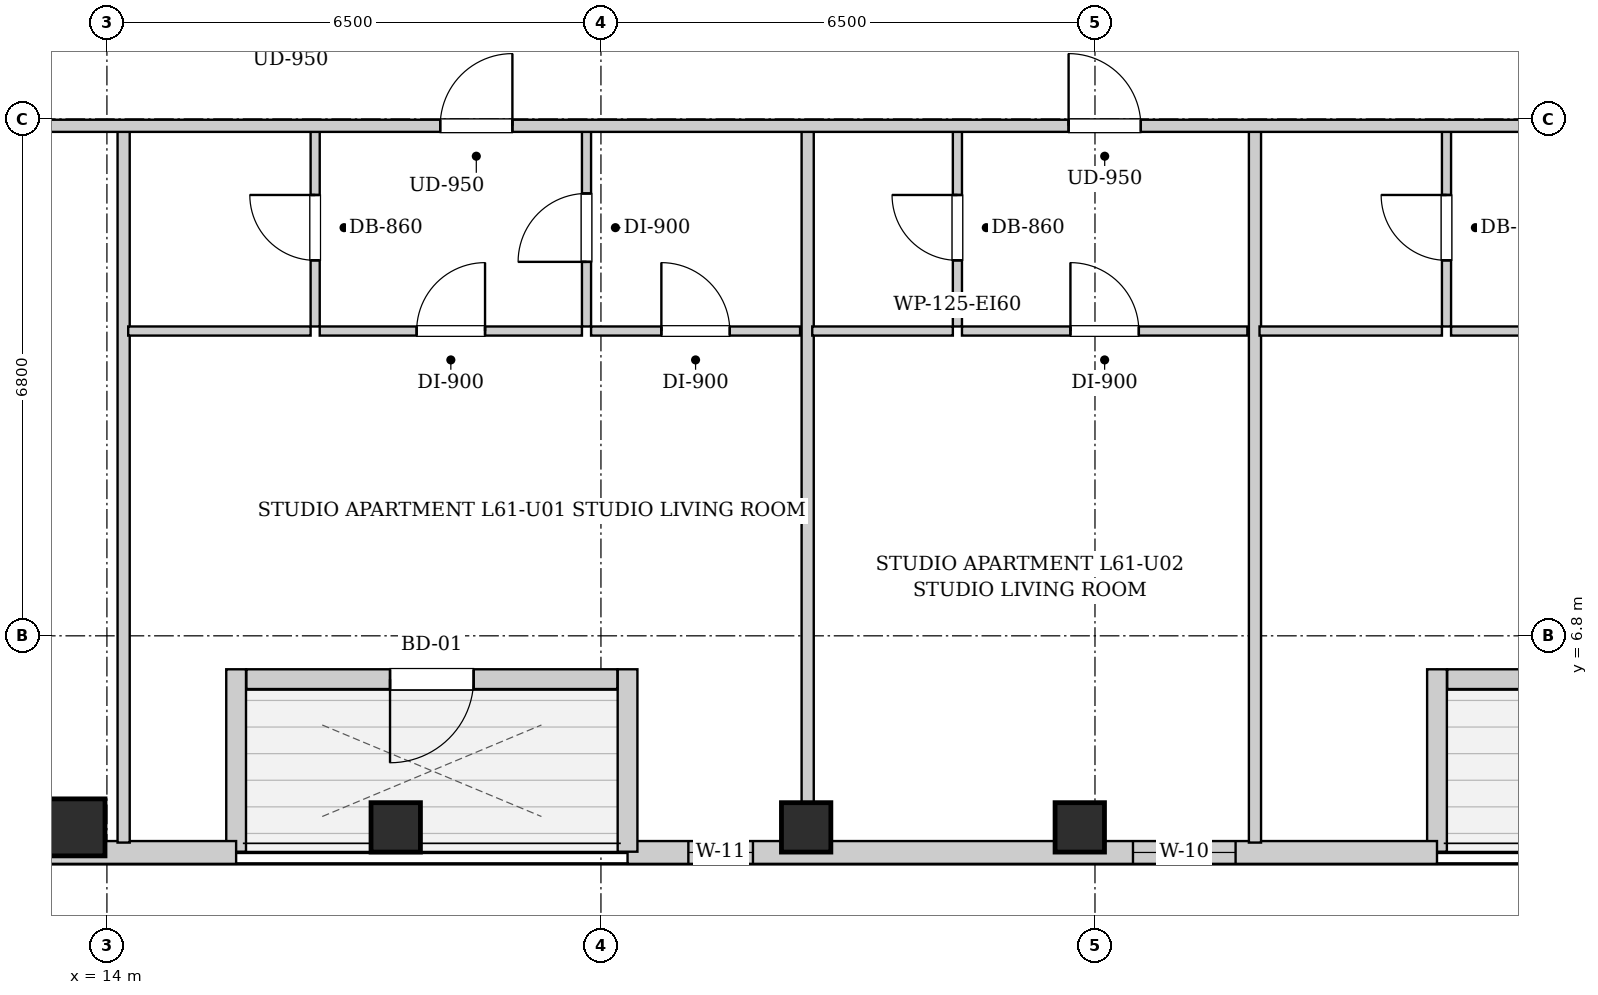
"""IFC4 building model, lengths in metres.
Left out: names, types, materials, properties, quantities, classifications, styles, units other than length and angle.
Written with IfcOpenShell. Run it as: python <this file> out.ifc"""

import sys

from ifc_helpers import new_model, si_unit, direction, frame, frame_2d, origin, origin_2d, place, context, subcontext, project, spatial, rectangle, extrude, element, fill, save


model = new_model("IFC4")
c1 = context("Model", 3, precision=1e-05, world=origin(), true_north=direction((0.0, 1.0)))
c2 = subcontext(c1, "Body", "Model", "MODEL_VIEW")
j1 = project(units=[si_unit("LENGTHUNIT", "METRE"), si_unit("PLANEANGLEUNIT", "RADIAN")], contexts=[c1])
p1 = place(None, origin())
s1 = spatial("IfcSite", under=j1, at=p1, CompositionType="ELEMENT")
p2 = place(p1, origin())
s2 = spatial("IfcBuilding", under=s1, at=p2, CompositionType="ELEMENT")
p3 = place(p2, frame((0.0, 0.0, 210.7)))
s3 = spatial("IfcBuildingStorey", under=s2, at=p3, CompositionType="ELEMENT", Elevation=210.7)
p4 = place(p3, frame((13.6, 4.28, 0.0), z_axis=(0.0, 0.0, 1.0), x_axis=(1.0, 0.0, 0.0)))
e1 = element("IfcColumn", 1, at=p4, inside=s3, PredefinedType="COLUMN", context=c2, shape_type="SweptSolid", body=[
    extrude(rectangle(XDim=0.75, YDim=0.75, at=origin_2d()), origin(), (0.0, 0.0, 1.0), 3.3),
])
for number, where, z_axis, x_axis in (
    (2, (17.8, 4.28, 0.0), (0.0, 0.0, 1.0), (1.0, 0.0, 0.0)),
    (3, (23.2, 4.28, 0.0), (0.0, 0.0, 1.0), (1.0, 0.0, 0.0)),
    (4, (26.8, 4.28, 0.0), (0.0, 0.0, 1.0), (1.0, 0.0, 0.0)),
):
    element("IfcColumn", number, at=place(p3, frame(where, z_axis=z_axis, x_axis=x_axis)), inside=s3, PredefinedType="COLUMN", context=c2, shape_type="SweptSolid", body=[
        extrude(rectangle(XDim=0.65, YDim=0.65, at=origin_2d()), origin(), (0.0, 0.0, 1.0), 3.3),
    ])
p5 = place(p3, frame((36.366, 6.23, 0.0), z_axis=(0.0, 0.0, 1.0), x_axis=(-1.0, 0.0, 0.0)))
e5 = element("IfcWall", 5, at=p5, inside=s3, PredefinedType="SOLIDWALL", context=c2, shape_type="SweptSolid", body=[
    extrude(rectangle(XDim=4.732, YDim=0.26, at=frame_2d((2.366, 0.0))), origin(), (0.0, 0.0, 1.0), 3.04),
])
p6 = place(p5, frame((1.816, 0.0, 0.0)))
e6 = element("IfcOpeningElement", 6, at=p6, cuts=e5, PredefinedType="OPENING", context=c2, shape_type="SweptSolid", body=[
    extrude(rectangle(XDim=1.1, YDim=2.0, at=frame_2d((0.55, 1.0))), frame((0.0, 0.14, 0.0), z_axis=(0.0, -1.0, 0.0), x_axis=(1.0, 0.0, 0.0)), (0.0, 0.0, 1.0), 0.28),
])
p7 = place(p3, frame((31.5, 6.36, 0.0), z_axis=(0.0, 0.0, 1.0), x_axis=(0.0, -1.0, 0.0)))
e7 = element("IfcWall", 7, at=p7, inside=s3, PredefinedType="SOLIDWALL", context=c2, shape_type="SweptSolid", body=[
    extrude(rectangle(XDim=2.4, YDim=0.26, at=frame_2d((1.2, 0.0))), origin(), (0.0, 0.0, 1.0), 3.04),
])
p8 = place(p3, frame((31.5, 3.95, 0.0), z_axis=(0.0, 0.0, 1.0), x_axis=(-1.0, 0.0, 0.0)))
e8 = element("IfcWall", 8, at=p8, inside=s3, PredefinedType="SOLIDWALL", context=c2, shape_type="SweptSolid", body=[
    extrude(rectangle(XDim=10.65, YDim=0.3, at=frame_2d((5.325, 0.0))), origin(), (0.0, 0.0, 1.0), 3.04),
])
p9 = place(p8, frame((9.0, 0.0, 0.55)))
e9 = element("IfcOpeningElement", 9, at=p9, cuts=e8, PredefinedType="OPENING", context=c2, shape_type="SweptSolid", body=[
    extrude(rectangle(XDim=0.85, YDim=1.2, at=frame_2d((0.425, 0.6))), frame((0.0, 0.16, 0.0), z_axis=(0.0, -1.0, 0.0), x_axis=(1.0, 0.0, 0.0)), (0.0, 0.0, 1.0), 0.32),
])
p10 = place(p8, frame((2.65, 0.0, 0.55)))
e10 = element("IfcOpeningElement", 10, at=p10, cuts=e8, PredefinedType="OPENING", context=c2, shape_type="SweptSolid", body=[
    extrude(rectangle(XDim=1.35, YDim=1.2, at=frame_2d((0.675, 0.6))), frame((0.0, 0.16, 0.0), z_axis=(0.0, -1.0, 0.0), x_axis=(1.0, 0.0, 0.0)), (0.0, 0.0, 1.0), 0.32),
])
p11 = place(p3, frame((20.85, 3.96, 0.0), z_axis=(0.0, 0.0, 1.0), x_axis=(0.0, 1.0, 0.0)))
e11 = element("IfcWall", 11, at=p11, inside=s3, PredefinedType="SOLIDWALL", context=c2, shape_type="SweptSolid", body=[
    extrude(rectangle(XDim=2.4, YDim=0.26, at=frame_2d((1.2, 0.0))), origin(), (0.0, 0.0, 1.0), 3.04),
])
p12 = place(p3, frame((20.716, 6.23, 0.0), z_axis=(0.0, 0.0, 1.0), x_axis=(-1.0, 0.0, 0.0)))
e12 = element("IfcWall", 12, at=p12, inside=s3, PredefinedType="SOLIDWALL", context=c2, shape_type="SweptSolid", body=[
    extrude(rectangle(XDim=4.882, YDim=0.26, at=frame_2d((2.441, 0.0))), origin(), (0.0, 0.0, 1.0), 3.04),
])
p13 = place(p12, frame((1.891, 0.0, 0.0)))
e13 = element("IfcOpeningElement", 13, at=p13, cuts=e12, PredefinedType="OPENING", context=c2, shape_type="SweptSolid", body=[
    extrude(rectangle(XDim=1.1, YDim=2.0, at=frame_2d((0.55, 1.0))), frame((0.0, 0.14, 0.0), z_axis=(0.0, -1.0, 0.0), x_axis=(1.0, 0.0, 0.0)), (0.0, 0.0, 1.0), 0.28),
])
p14 = place(p3, frame((15.7, 6.36, 0.0), z_axis=(0.0, 0.0, 1.0), x_axis=(0.0, -1.0, 0.0)))
e14 = element("IfcWall", 14, at=p14, inside=s3, PredefinedType="SOLIDWALL", context=c2, shape_type="SweptSolid", body=[
    extrude(rectangle(XDim=2.4, YDim=0.26, at=frame_2d((1.2, 0.0))), origin(), (0.0, 0.0, 1.0), 3.04),
])
p15 = place(p3, frame((15.7, 3.95, 0.0), z_axis=(0.0, 0.0, 1.0), x_axis=(-1.0, 0.0, 0.0)))
e15 = element("IfcWall", 15, at=p15, inside=s3, PredefinedType="SOLIDWALL", context=c2, shape_type="SweptSolid", body=[
    extrude(rectangle(XDim=2.6, YDim=0.3, at=frame_2d((1.3, 0.0))), origin(), (0.0, 0.0, 1.0), 3.04),
])
p16 = place(p3, frame((14.22, 4.08, 0.0), z_axis=(0.0, 0.0, 1.0), x_axis=(0.0, 1.0, 0.0)))
e16 = element("IfcWall", 16, at=p16, inside=s3, PredefinedType="PARTITIONING", context=c2, shape_type="SweptSolid", body=[
    extrude(rectangle(XDim=9.39, YDim=0.16, at=frame_2d((4.695, 0.0))), origin(), (0.0, 0.0, 1.0), 3.04),
])
p17 = place(p3, frame((16.74, 10.87, 0.0), z_axis=(0.0, 0.0, 1.0), x_axis=(0.0, 1.0, 0.0)))
e17 = element("IfcWall", 17, at=p17, inside=s3, PredefinedType="PARTITIONING", context=c2, shape_type="SweptSolid", body=[
    extrude(rectangle(XDim=2.6, YDim=0.12, at=frame_2d((1.3, 0.0))), origin(), (0.0, 0.0, 1.0), 3.04),
])
p18 = place(p17, frame((0.87, 0.0, 0.0)))
e18 = element("IfcOpeningElement", 18, at=p18, cuts=e17, PredefinedType="OPENING", context=c2, shape_type="SweptSolid", body=[
    extrude(rectangle(XDim=0.86, YDim=2.05, at=frame_2d((0.43, 1.025))), frame((0.0, 0.07, 0.0), z_axis=(0.0, -1.0, 0.0), x_axis=(1.0, 0.0, 0.0)), (0.0, 0.0, 1.0), 0.14),
])
p19 = place(p3, frame((14.28, 10.81, 0.0), z_axis=(0.0, 0.0, 1.0), x_axis=(1.0, 0.0, 0.0)))
e19 = element("IfcWall", 19, at=p19, inside=s3, PredefinedType="PARTITIONING", context=c2, shape_type="SweptSolid", body=[
    extrude(rectangle(XDim=2.4, YDim=0.12, at=frame_2d((1.2, 0.0))), origin(), (0.0, 0.0, 1.0), 3.04),
])
p20 = place(p3, frame((20.31, 10.87, 0.0), z_axis=(0.0, 0.0, 1.0), x_axis=(0.0, 1.0, 0.0)))
e20 = element("IfcWall", 20, at=p20, inside=s3, PredefinedType="PARTITIONING", context=c2, shape_type="SweptSolid", body=[
    extrude(rectangle(XDim=2.6, YDim=0.12, at=frame_2d((1.3, 0.0))), origin(), (0.0, 0.0, 1.0), 3.04),
])
p21 = place(p20, frame((0.85, 0.0, 0.0)))
e21 = element("IfcOpeningElement", 21, at=p21, cuts=e20, PredefinedType="OPENING", context=c2, shape_type="SweptSolid", body=[
    extrude(rectangle(XDim=0.9, YDim=2.05, at=frame_2d((0.45, 1.025))), frame((0.0, 0.07, 0.0), z_axis=(0.0, -1.0, 0.0), x_axis=(1.0, 0.0, 0.0)), (0.0, 0.0, 1.0), 0.14),
])
p22 = place(p3, frame((16.8, 10.81, 0.0), z_axis=(0.0, 0.0, 1.0), x_axis=(1.0, 0.0, 0.0)))
e22 = element("IfcWall", 22, at=p22, inside=s3, PredefinedType="PARTITIONING", context=c2, shape_type="SweptSolid", body=[
    extrude(rectangle(XDim=3.45, YDim=0.12, at=frame_2d((1.725, 0.0))), origin(), (0.0, 0.0, 1.0), 3.04),
])
p23 = place(p22, frame((1.275, 0.0, 0.0)))
e23 = element("IfcOpeningElement", 23, at=p23, cuts=e22, PredefinedType="OPENING", context=c2, shape_type="SweptSolid", body=[
    extrude(rectangle(XDim=0.9, YDim=2.05, at=frame_2d((0.45, 1.025))), frame((0.0, 0.07, 0.0), z_axis=(0.0, -1.0, 0.0), x_axis=(1.0, 0.0, 0.0)), (0.0, 0.0, 1.0), 0.14),
])
p24 = place(p3, frame((20.37, 10.81, 0.0), z_axis=(0.0, 0.0, 1.0), x_axis=(1.0, 0.0, 0.0)))
e24 = element("IfcWall", 24, at=p24, inside=s3, PredefinedType="PARTITIONING", context=c2, shape_type="SweptSolid", body=[
    extrude(rectangle(XDim=2.75, YDim=0.12, at=frame_2d((1.375, 0.0))), origin(), (0.0, 0.0, 1.0), 3.04),
])
p25 = place(p24, frame((0.925, 0.0, 0.0)))
e25 = element("IfcOpeningElement", 25, at=p25, cuts=e24, PredefinedType="OPENING", context=c2, shape_type="SweptSolid", body=[
    extrude(rectangle(XDim=0.9, YDim=2.05, at=frame_2d((0.45, 1.025))), frame((0.0, 0.07, 0.0), z_axis=(0.0, -1.0, 0.0), x_axis=(1.0, 0.0, 0.0)), (0.0, 0.0, 1.0), 0.14),
])
p26 = place(p3, frame((23.22, 4.08, 0.0), z_axis=(0.0, 0.0, 1.0), x_axis=(0.0, 1.0, 0.0)))
e26 = element("IfcWall", 26, at=p26, inside=s3, PredefinedType="PARTITIONING", context=c2, shape_type="SweptSolid", body=[
    extrude(rectangle(XDim=9.39, YDim=0.16, at=frame_2d((4.695, 0.0))), origin(), (0.0, 0.0, 1.0), 3.04),
])
p27 = place(p3, frame((25.19, 10.87, 0.0), z_axis=(0.0, 0.0, 1.0), x_axis=(0.0, 1.0, 0.0)))
e27 = element("IfcWall", 27, at=p27, inside=s3, PredefinedType="PARTITIONING", context=c2, shape_type="SweptSolid", body=[
    extrude(rectangle(XDim=2.6, YDim=0.12, at=frame_2d((1.3, 0.0))), origin(), (0.0, 0.0, 1.0), 3.04),
])
p28 = place(p27, frame((0.87, 0.0, 0.0)))
e28 = element("IfcOpeningElement", 28, at=p28, cuts=e27, PredefinedType="OPENING", context=c2, shape_type="SweptSolid", body=[
    extrude(rectangle(XDim=0.86, YDim=2.05, at=frame_2d((0.43, 1.025))), frame((0.0, 0.07, 0.0), z_axis=(0.0, -1.0, 0.0), x_axis=(1.0, 0.0, 0.0)), (0.0, 0.0, 1.0), 0.14),
])
p29 = place(p3, frame((23.28, 10.81, 0.0), z_axis=(0.0, 0.0, 1.0), x_axis=(1.0, 0.0, 0.0)))
e29 = element("IfcWall", 29, at=p29, inside=s3, PredefinedType="PARTITIONING", context=c2, shape_type="SweptSolid", body=[
    extrude(rectangle(XDim=1.85, YDim=0.12, at=frame_2d((0.925, 0.0))), origin(), (0.0, 0.0, 1.0), 3.04),
])
p30 = place(p3, frame((25.25, 10.81, 0.0), z_axis=(0.0, 0.0, 1.0), x_axis=(1.0, 0.0, 0.0)))
e30 = element("IfcWall", 30, at=p30, inside=s3, PredefinedType="PARTITIONING", context=c2, shape_type="SweptSolid", body=[
    extrude(rectangle(XDim=3.755, YDim=0.12, at=frame_2d((1.877, 0.0))), origin(), (0.0, 0.0, 1.0), 3.04),
])
p31 = place(p30, frame((1.427, 0.0, 0.0)))
e31 = element("IfcOpeningElement", 31, at=p31, cuts=e30, PredefinedType="OPENING", context=c2, shape_type="SweptSolid", body=[
    extrude(rectangle(XDim=0.9, YDim=2.05, at=frame_2d((0.45, 1.025))), frame((0.0, 0.07, 0.0), z_axis=(0.0, -1.0, 0.0), x_axis=(1.0, 0.0, 0.0)), (0.0, 0.0, 1.0), 0.14),
])
p32 = place(p3, frame((29.105, 4.08, 0.0), z_axis=(0.0, 0.0, 1.0), x_axis=(0.0, 1.0, 0.0)))
e32 = element("IfcWall", 32, at=p32, inside=s3, PredefinedType="PARTITIONING", context=c2, shape_type="SweptSolid", body=[
    extrude(rectangle(XDim=9.39, YDim=0.16, at=frame_2d((4.695, 0.0))), origin(), (0.0, 0.0, 1.0), 3.04),
])
p33 = place(p3, frame((31.625, 10.87, 0.0), z_axis=(0.0, 0.0, 1.0), x_axis=(0.0, 1.0, 0.0)))
e33 = element("IfcWall", 33, at=p33, inside=s3, PredefinedType="PARTITIONING", context=c2, shape_type="SweptSolid", body=[
    extrude(rectangle(XDim=2.6, YDim=0.12, at=frame_2d((1.3, 0.0))), origin(), (0.0, 0.0, 1.0), 3.04),
])
p34 = place(p33, frame((0.87, 0.0, 0.0)))
e34 = element("IfcOpeningElement", 34, at=p34, cuts=e33, PredefinedType="OPENING", context=c2, shape_type="SweptSolid", body=[
    extrude(rectangle(XDim=0.86, YDim=2.05, at=frame_2d((0.43, 1.025))), frame((0.0, 0.07, 0.0), z_axis=(0.0, -1.0, 0.0), x_axis=(1.0, 0.0, 0.0)), (0.0, 0.0, 1.0), 0.14),
])
p35 = place(p3, frame((29.165, 10.81, 0.0), z_axis=(0.0, 0.0, 1.0), x_axis=(1.0, 0.0, 0.0)))
e35 = element("IfcWall", 35, at=p35, inside=s3, PredefinedType="PARTITIONING", context=c2, shape_type="SweptSolid", body=[
    extrude(rectangle(XDim=2.4, YDim=0.12, at=frame_2d((1.2, 0.0))), origin(), (0.0, 0.0, 1.0), 3.04),
])
p36 = place(p3, frame((31.685, 10.81, 0.0), z_axis=(0.0, 0.0, 1.0), x_axis=(1.0, 0.0, 0.0)))
e36 = element("IfcWall", 36, at=p36, inside=s3, PredefinedType="PARTITIONING", context=c2, shape_type="SweptSolid", body=[
    extrude(rectangle(XDim=3.45, YDim=0.12, at=frame_2d((1.725, 0.0))), origin(), (0.0, 0.0, 1.0), 3.04),
])
p37 = place(p36, frame((1.275, 0.0, 0.0)))
e37 = element("IfcOpeningElement", 37, at=p37, cuts=e36, PredefinedType="OPENING", context=c2, shape_type="SweptSolid", body=[
    extrude(rectangle(XDim=0.9, YDim=2.05, at=frame_2d((0.45, 1.025))), frame((0.0, 0.07, 0.0), z_axis=(0.0, -1.0, 0.0), x_axis=(1.0, 0.0, 0.0)), (0.0, 0.0, 1.0), 0.14),
])
p38 = place(p3, frame((13.15, 13.51, 0.0), z_axis=(0.0, 0.0, 1.0), x_axis=(1.0, 0.0, 0.0)))
e38 = element("IfcWall", 38, at=p38, inside=s3, PredefinedType="PARTITIONING", context=c2, shape_type="SweptSolid", body=[
    extrude(rectangle(XDim=24.6, YDim=0.16, at=frame_2d((12.3, 0.0))), origin(), (0.0, 0.0, 1.0), 3.04),
])
p39 = place(p38, frame((5.235, 0.0, 0.0)))
e39 = element("IfcOpeningElement", 39, at=p39, cuts=e38, PredefinedType="OPENING", context=c2, shape_type="SweptSolid", body=[
    extrude(rectangle(XDim=0.95, YDim=2.1, at=frame_2d((0.475, 1.05))), frame((0.0, 0.09, 0.0), z_axis=(0.0, -1.0, 0.0), x_axis=(1.0, 0.0, 0.0)), (0.0, 0.0, 1.0), 0.18),
])
p40 = place(p38, frame((13.503, 0.0, 0.0)))
e40 = element("IfcOpeningElement", 40, at=p40, cuts=e38, PredefinedType="OPENING", context=c2, shape_type="SweptSolid", body=[
    extrude(rectangle(XDim=0.95, YDim=2.1, at=frame_2d((0.475, 1.05))), frame((0.0, 0.09, 0.0), z_axis=(0.0, -1.0, 0.0), x_axis=(1.0, 0.0, 0.0)), (0.0, 0.0, 1.0), 0.18),
])
p41 = place(p38, frame((20.635, 0.0, 0.0)))
e41 = element("IfcOpeningElement", 41, at=p41, cuts=e38, PredefinedType="OPENING", context=c2, shape_type="SweptSolid", body=[
    extrude(rectangle(XDim=0.95, YDim=2.1, at=frame_2d((0.475, 1.05))), frame((0.0, 0.09, 0.0), z_axis=(0.0, -1.0, 0.0), x_axis=(1.0, 0.0, 0.0)), (0.0, 0.0, 1.0), 0.18),
])
p42 = place(p18, origin())
e42 = element("IfcDoor", 42, at=p42, inside=s3, OperationType="SINGLE_SWING_RIGHT", PredefinedType="DOOR", context=c2, shape_type="SweptSolid", body=[
    extrude(rectangle(XDim=0.86, YDim=2.05, at=frame_2d((0.43, 1.025))), frame((0.0, 0.025, 0.0), z_axis=(0.0, -1.0, 0.0), x_axis=(1.0, 0.0, 0.0)), (0.0, 0.0, 1.0), 0.05),
])
fill(e18, e42)
p43 = place(p21, origin())
e43 = element("IfcDoor", 43, at=p43, inside=s3, OperationType="SINGLE_SWING_LEFT", PredefinedType="DOOR", context=c2, shape_type="SweptSolid", body=[
    extrude(rectangle(XDim=0.9, YDim=2.05, at=frame_2d((0.45, 1.025))), frame((0.0, 0.025, 0.0), z_axis=(0.0, -1.0, 0.0), x_axis=(1.0, 0.0, 0.0)), (0.0, 0.0, 1.0), 0.05),
])
fill(e21, e43)
p44 = place(p23, origin())
e44 = element("IfcDoor", 44, at=p44, inside=s3, OperationType="SINGLE_SWING_RIGHT", PredefinedType="DOOR", context=c2, shape_type="SweptSolid", body=[
    extrude(rectangle(XDim=0.9, YDim=2.05, at=frame_2d((0.45, 1.025))), frame((0.0, 0.025, 0.0), z_axis=(0.0, -1.0, 0.0), x_axis=(1.0, 0.0, 0.0)), (0.0, 0.0, 1.0), 0.05),
])
fill(e23, e44)
p45 = place(p25, origin())
e45 = element("IfcDoor", 45, at=p45, inside=s3, OperationType="SINGLE_SWING_LEFT", PredefinedType="DOOR", context=c2, shape_type="SweptSolid", body=[
    extrude(rectangle(XDim=0.9, YDim=2.05, at=frame_2d((0.45, 1.025))), frame((0.0, 0.025, 0.0), z_axis=(0.0, -1.0, 0.0), x_axis=(1.0, 0.0, 0.0)), (0.0, 0.0, 1.0), 0.05),
])
fill(e25, e45)
p46 = place(p28, origin())
e46 = element("IfcDoor", 46, at=p46, inside=s3, OperationType="SINGLE_SWING_RIGHT", PredefinedType="DOOR", context=c2, shape_type="SweptSolid", body=[
    extrude(rectangle(XDim=0.86, YDim=2.05, at=frame_2d((0.43, 1.025))), frame((0.0, 0.025, 0.0), z_axis=(0.0, -1.0, 0.0), x_axis=(1.0, 0.0, 0.0)), (0.0, 0.0, 1.0), 0.05),
])
fill(e28, e46)
p47 = place(p31, origin())
e47 = element("IfcDoor", 47, at=p47, inside=s3, OperationType="SINGLE_SWING_LEFT", PredefinedType="DOOR", context=c2, shape_type="SweptSolid", body=[
    extrude(rectangle(XDim=0.9, YDim=2.05, at=frame_2d((0.45, 1.025))), frame((0.0, 0.025, 0.0), z_axis=(0.0, -1.0, 0.0), x_axis=(1.0, 0.0, 0.0)), (0.0, 0.0, 1.0), 0.05),
])
fill(e31, e47)
p48 = place(p34, origin())
e48 = element("IfcDoor", 48, at=p48, inside=s3, OperationType="SINGLE_SWING_RIGHT", PredefinedType="DOOR", context=c2, shape_type="SweptSolid", body=[
    extrude(rectangle(XDim=0.86, YDim=2.05, at=frame_2d((0.43, 1.025))), frame((0.0, 0.025, 0.0), z_axis=(0.0, -1.0, 0.0), x_axis=(1.0, 0.0, 0.0)), (0.0, 0.0, 1.0), 0.05),
])
fill(e34, e48)
p49 = place(p39, origin())
e49 = element("IfcDoor", 49, at=p49, inside=s3, OperationType="SINGLE_SWING_RIGHT", PredefinedType="DOOR", context=c2, shape_type="SweptSolid", body=[
    extrude(rectangle(XDim=0.95, YDim=2.1, at=frame_2d((0.475, 1.05))), frame((0.0, 0.025, 0.0), z_axis=(0.0, -1.0, 0.0), x_axis=(1.0, 0.0, 0.0)), (0.0, 0.0, 1.0), 0.05),
])
fill(e39, e49)
p50 = place(p40, origin())
e50 = element("IfcDoor", 50, at=p50, inside=s3, OperationType="SINGLE_SWING_LEFT", PredefinedType="DOOR", context=c2, shape_type="SweptSolid", body=[
    extrude(rectangle(XDim=0.95, YDim=2.1, at=frame_2d((0.475, 1.05))), frame((0.0, 0.025, 0.0), z_axis=(0.0, -1.0, 0.0), x_axis=(1.0, 0.0, 0.0)), (0.0, 0.0, 1.0), 0.05),
])
fill(e40, e50)
p51 = place(p13, origin())
e51 = element("IfcDoor", 51, at=p51, inside=s3, OperationType="SINGLE_SWING_RIGHT", PredefinedType="DOOR", context=c2, shape_type="SweptSolid", body=[
    extrude(rectangle(XDim=1.1, YDim=2.0, at=frame_2d((0.55, 1.0))), frame((0.0, 0.025, 0.0), z_axis=(0.0, -1.0, 0.0), x_axis=(1.0, 0.0, 0.0)), (0.0, 0.0, 1.0), 0.05),
])
fill(e13, e51)
p52 = place(p9, origin())
e52 = element("IfcWindow", 52, at=p52, inside=s3, PartitioningType="SINGLE_PANEL", PredefinedType="WINDOW", context=c2, shape_type="SweptSolid", body=[
    extrude(rectangle(XDim=0.85, YDim=1.2, at=frame_2d((0.425, 0.6))), frame((0.0, 0.03, 0.0), z_axis=(0.0, -1.0, 0.0), x_axis=(1.0, 0.0, 0.0)), (0.0, 0.0, 1.0), 0.06),
])
fill(e9, e52)
p53 = place(p10, origin())
e53 = element("IfcWindow", 53, at=p53, inside=s3, PartitioningType="SINGLE_PANEL", PredefinedType="WINDOW", context=c2, shape_type="SweptSolid", body=[
    extrude(rectangle(XDim=1.35, YDim=1.2, at=frame_2d((0.675, 0.6))), frame((0.0, 0.03, 0.0), z_axis=(0.0, -1.0, 0.0), x_axis=(1.0, 0.0, 0.0)), (0.0, 0.0, 1.0), 0.06),
])
fill(e10, e53)
save(model, sys.argv[1])
